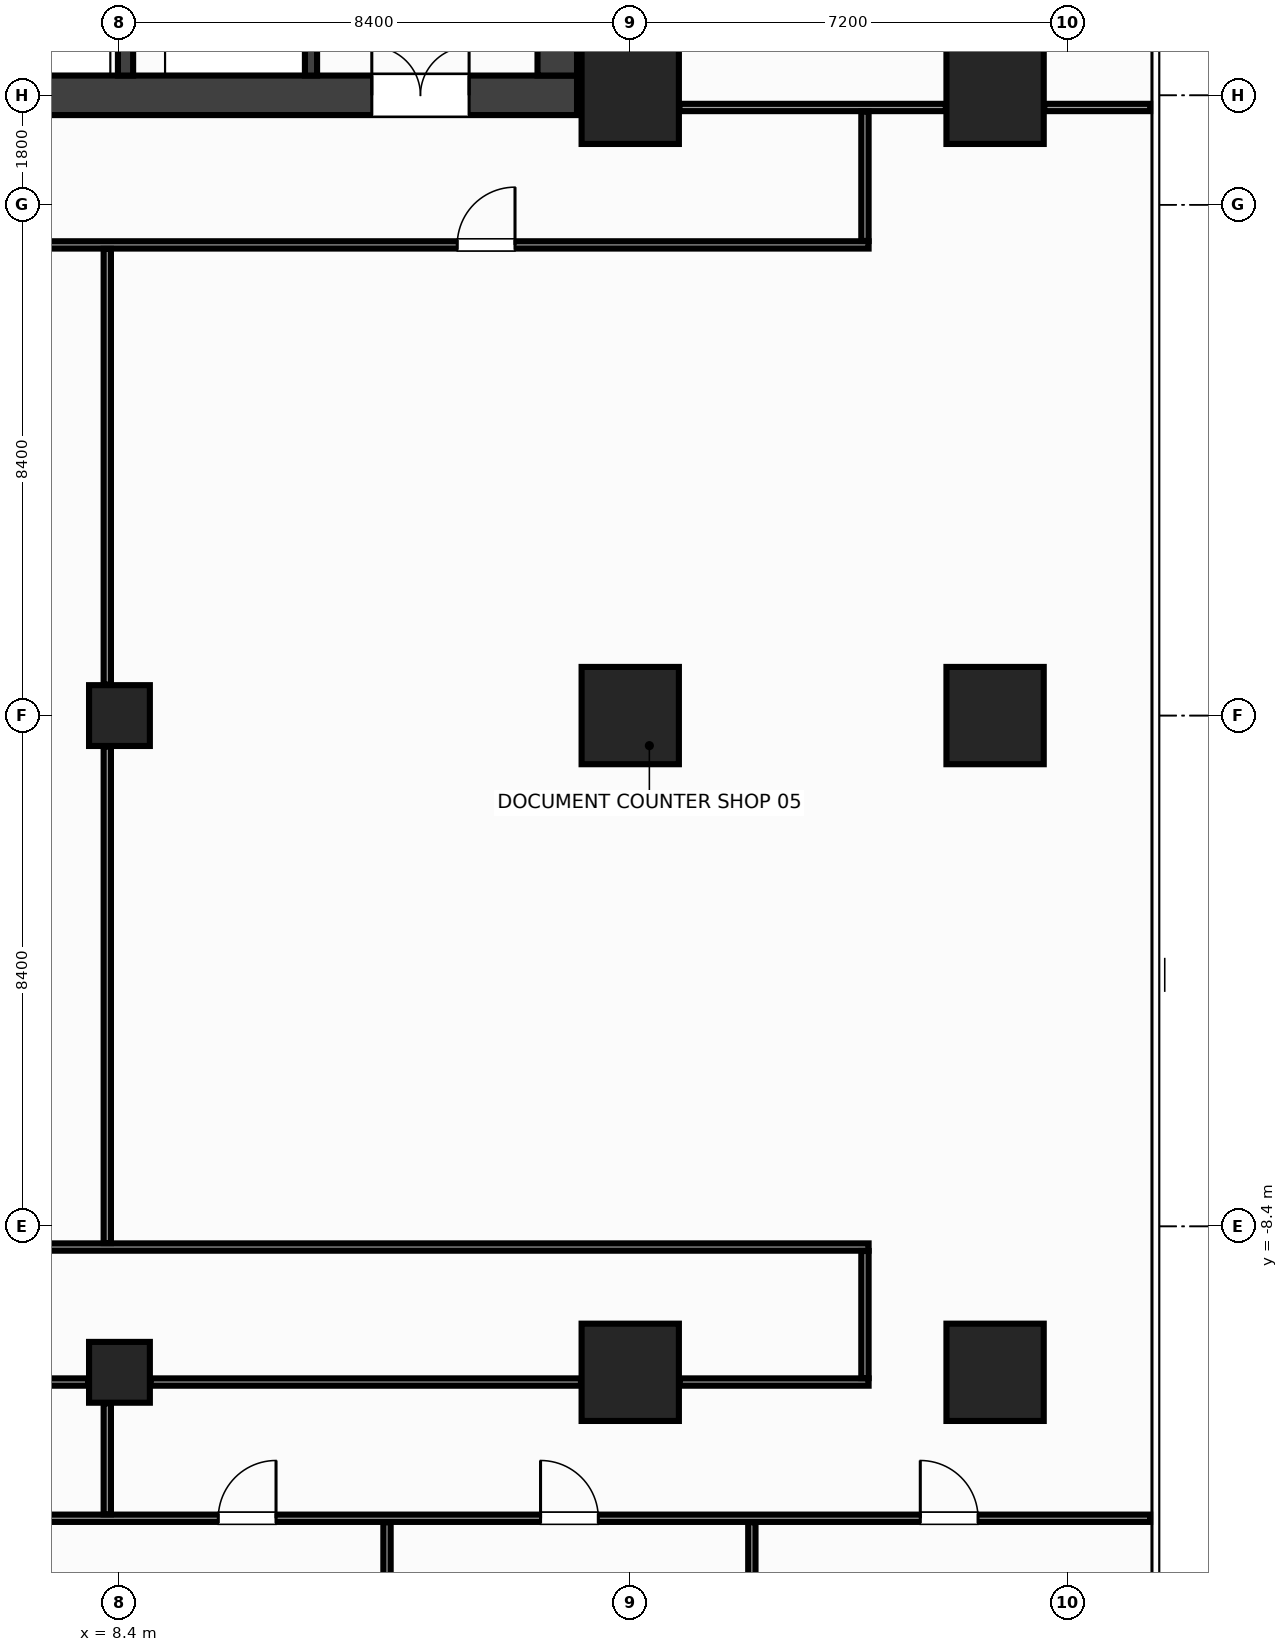
"""IFC4 building model, lengths in metres.
Left out: names, types, materials, properties, quantities, classifications, styles, units other than length and angle.
Written with IfcOpenShell. Run it as: python <this file> out.ifc"""

import sys

from ifc_helpers import new_model, si_unit, direction, frame, frame_2d, origin, origin_2d, place, context, subcontext, project, spatial, rectangle, hollow_rectangle, extrude, source, transform, mapped, element, fill, save


model = new_model("IFC4")
c1 = context("Model", 3, precision=1e-05, world=origin(), true_north=direction((0.0, 1.0)))
c2 = subcontext(c1, "Body", "Model", "MODEL_VIEW")
j1 = project(units=[si_unit("LENGTHUNIT", "METRE"), si_unit("PLANEANGLEUNIT", "RADIAN")], contexts=[c1])
p1 = place(None, origin())
s1 = spatial("IfcSite", under=j1, at=p1, CompositionType="ELEMENT")
p2 = place(p1, origin())
s2 = spatial("IfcBuilding", under=s1, at=p2, CompositionType="ELEMENT")
p3 = place(p2, frame((0.0, 0.0, 88.4)))
s3 = spatial("IfcBuildingStorey", under=s2, at=p3, CompositionType="ELEMENT", Elevation=88.4)
m1 = source(origin(), c2, "Body", "SweptSolid", [
    extrude(rectangle(XDim=31.85, YDim=0.65, at=frame_2d((15.925, 0.0))), origin(), (0.0, 0.0, 1.0), 3.6),
])
p4 = place(p3, frame((-15.925, 10.2, 0.0), z_axis=(0.0, 0.0, 1.0), x_axis=(1.0, 0.0, 0.0)))
e1 = element("IfcWall", 1, at=p4, inside=s3, PredefinedType="SHEAR", context=c2, shape_type="MappedRepresentation", body=[
    mapped(m1, transform((0.0, 0.0, 0.0), x_axis=(1.0, 0.0, 0.0), y_axis=(0.0, 1.0, 0.0), z_axis=(0.0, 0.0, 1.0), scale=1.0)),
])
p5 = place(p4, frame((1.775, 0.0, 0.0)))
e2 = element("IfcOpeningElement", 2, at=p5, cuts=e1, PredefinedType="OPENING", context=c2, shape_type="SweptSolid", body=[
    extrude(rectangle(XDim=1.6, YDim=2.15, at=frame_2d((0.8, 1.075))), frame((0.0, 0.337, 0.0), z_axis=(0.0, -1.0, 0.0), x_axis=(1.0, 0.0, 0.0)), (0.0, 0.0, 1.0), 0.674),
])
p6 = place(p4, frame((28.475, 0.0, 0.0)))
e3 = element("IfcOpeningElement", 3, at=p6, cuts=e1, PredefinedType="OPENING", context=c2, shape_type="SweptSolid", body=[
    extrude(rectangle(XDim=1.6, YDim=2.15, at=frame_2d((0.8, 1.075))), frame((0.0, 0.337, 0.0), z_axis=(0.0, -1.0, 0.0), x_axis=(1.0, 0.0, 0.0)), (0.0, 0.0, 1.0), 0.674),
])
p7 = place(p4, frame((15.175, 0.0, 0.0)))
e4 = element("IfcOpeningElement", 4, at=p7, cuts=e1, PredefinedType="OPENING", context=c2, shape_type="SweptSolid", body=[
    extrude(rectangle(XDim=1.5, YDim=2.2, at=frame_2d((0.75, 1.1))), frame((0.0, 0.337, 0.0), z_axis=(0.0, -1.0, 0.0), x_axis=(1.0, 0.0, 0.0)), (0.0, 0.0, 1.0), 0.674),
])
m2 = source(origin(), c2, "Body", "SweptSolid", [
    extrude(rectangle(XDim=12.95, YDim=0.65, at=frame_2d((6.475, 0.0))), origin(), (0.0, 0.0, 1.0), 3.6),
])
p8 = place(p3, frame((15.6, 10.525, 0.0), z_axis=(0.0, 0.0, 1.0), x_axis=(0.0, 1.0, 0.0)))
e5 = element("IfcWall", 5, at=p8, inside=s3, PredefinedType="SHEAR", context=c2, shape_type="MappedRepresentation", body=[
    mapped(m2, transform((0.0, 0.0, 0.0), x_axis=(1.0, 0.0, 0.0), y_axis=(0.0, 1.0, 0.0), z_axis=(0.0, 0.0, 1.0), scale=1.0)),
])
m3 = source(origin(), c2, "Body", "SweptSolid", [
    extrude(rectangle(XDim=12.95, YDim=0.25, at=frame_2d((6.475, 0.0))), origin(), (0.0, 0.0, 1.0), 3.6),
])
p9 = place(p3, frame((8.5, 10.525, 0.0), z_axis=(0.0, 0.0, 1.0), x_axis=(0.0, 1.0, 0.0)))
e6 = element("IfcWall", 6, at=p9, inside=s3, PredefinedType="SHEAR", context=c2, shape_type="MappedRepresentation", body=[
    mapped(m3, transform((0.0, 0.0, 0.0), x_axis=(1.0, 0.0, 0.0), y_axis=(0.0, 1.0, 0.0), z_axis=(0.0, 0.0, 1.0), scale=1.0)),
])
p10 = place(p9, frame((9.925, 0.0, 0.0)))
e7 = element("IfcOpeningElement", 7, at=p10, cuts=e6, PredefinedType="OPENING", context=c2, shape_type="SweptSolid", body=[
    extrude(rectangle(XDim=0.95, YDim=2.15, at=frame_2d((0.475, 1.075))), frame((0.0, 0.137, 0.0), z_axis=(0.0, -1.0, 0.0), x_axis=(1.0, 0.0, 0.0)), (0.0, 0.0, 1.0), 0.274),
])
m4 = source(origin(), c2, "Body", "SweptSolid", [
    extrude(rectangle(XDim=3.125, YDim=0.2, at=frame_2d((1.562, 0.0))), origin(), (0.0, 0.0, 1.0), 3.6),
])
p11 = place(p3, frame((11.55, 10.525, 0.0), z_axis=(0.0, 0.0, 1.0), x_axis=(0.0, 1.0, 0.0)))
e8 = element("IfcWall", 8, at=p11, inside=s3, PredefinedType="SHEAR", context=c2, shape_type="MappedRepresentation", body=[
    mapped(m4, transform((0.0, 0.0, 0.0), x_axis=(1.0, 0.0, 0.0), y_axis=(0.0, 1.0, 0.0), z_axis=(0.0, 0.0, 1.0), scale=1.0)),
])
p12 = place(p11, frame((0.9, 0.0, 0.0)))
e9 = element("IfcOpeningElement", 9, at=p12, cuts=e8, PredefinedType="OPENING", context=c2, shape_type="SweptSolid", body=[
    extrude(rectangle(XDim=1.1, YDim=2.15, at=frame_2d((0.55, 1.075))), frame((0.0, 0.112, 0.0), z_axis=(0.0, -1.0, 0.0), x_axis=(1.0, 0.0, 0.0)), (0.0, 0.0, 1.0), 0.224),
])
m5 = source(origin(), c2, "Body", "SweptSolid", [
    extrude(rectangle(XDim=1.6, YDim=1.6, at=origin_2d()), origin(), (0.0, 0.0, 1.0), 3.6),
])
for number, where, z_axis, x_axis in (
    (10, (16.8, -10.8, 0.0), (0.0, 0.0, 1.0), (1.0, 0.0, 0.0)),
    (11, (16.8, 0.0, 0.0), (0.0, 0.0, 1.0), (1.0, 0.0, 0.0)),
    (12, (16.8, 10.2, 0.0), (0.0, 0.0, 1.0), (1.0, 0.0, 0.0)),
    (13, (22.8, -10.8, 0.0), (0.0, 0.0, 1.0), (1.0, 0.0, 0.0)),
    (14, (22.8, 0.0, 0.0), (0.0, 0.0, 1.0), (1.0, 0.0, 0.0)),
    (15, (22.8, 10.2, 0.0), (0.0, 0.0, 1.0), (1.0, 0.0, 0.0)),
):
    element("IfcColumn", number, at=place(p3, frame(where, z_axis=z_axis, x_axis=x_axis)), inside=s3, PredefinedType="COLUMN", context=c2, shape_type="MappedRepresentation", body=[
        mapped(m5, transform((0.0, 0.0, 0.0), x_axis=(1.0, 0.0, 0.0), y_axis=(0.0, 1.0, 0.0), z_axis=(0.0, 0.0, 1.0), scale=1.0)),
    ])
m6 = source(origin(), c2, "Body", "SweptSolid", [
    extrude(hollow_rectangle(XDim=1.0, YDim=1.0, WallThickness=0.045, at=origin_2d()), origin(), (0.0, 0.0, 1.0), 3.6),
])
for number, where, z_axis, x_axis in (
    (16, (8.4, 0.0, 0.0), (0.0, 0.0, 1.0), (1.0, 0.0, 0.0)),
    (17, (8.4, -10.8, 0.0), (0.0, 0.0, 1.0), (1.0, 0.0, 0.0)),
):
    element("IfcColumn", number, at=place(p3, frame(where, z_axis=z_axis, x_axis=x_axis)), inside=s3, PredefinedType="COLUMN", context=c2, shape_type="MappedRepresentation", body=[
        mapped(m6, transform((0.0, 0.0, 0.0), x_axis=(1.0, 0.0, 0.0), y_axis=(0.0, 1.0, 0.0), z_axis=(0.0, 0.0, 1.0), scale=1.0)),
    ])
m7 = source(origin(), c2, "Body", "SweptSolid", [
    extrude(rectangle(XDim=4.38, YDim=0.12, at=frame_2d((2.19, 0.0))), origin(), (0.0, 0.0, 1.0), 2.745),
])
p13 = place(p3, frame((17.61, 10.0, 0.0), z_axis=(0.0, 0.0, 1.0), x_axis=(1.0, 0.0, 0.0)))
e18 = element("IfcWall", 18, at=p13, inside=s3, PredefinedType="PARTITIONING", context=c2, shape_type="MappedRepresentation", body=[
    mapped(m7, transform((0.0, 0.0, 0.0), x_axis=(1.0, 0.0, 0.0), y_axis=(0.0, 1.0, 0.0), z_axis=(0.0, 0.0, 1.0), scale=1.0)),
])
m8 = source(origin(), c2, "Body", "SweptSolid", [
    extrude(rectangle(XDim=1.74, YDim=0.12, at=frame_2d((0.87, 0.0))), origin(), (0.0, 0.0, 1.0), 3.36),
])
p14 = place(p3, frame((23.61, 10.0, 0.0), z_axis=(0.0, 0.0, 1.0), x_axis=(1.0, 0.0, 0.0)))
e19 = element("IfcWall", 19, at=p14, inside=s3, PredefinedType="PARTITIONING", context=c2, shape_type="MappedRepresentation", body=[
    mapped(m8, transform((0.0, 0.0, 0.0), x_axis=(1.0, 0.0, 0.0), y_axis=(0.0, 1.0, 0.0), z_axis=(0.0, 0.0, 1.0), scale=1.0)),
])
m9 = source(origin(), c2, "Body", "SweptSolid", [
    extrude(rectangle(XDim=22.3, YDim=0.12, at=frame_2d((11.15, 0.0))), origin(), (0.0, 0.0, 1.0), 2.745),
])
p15 = place(p3, frame((-1.58, 7.74, 0.0), z_axis=(0.0, 0.0, 1.0), x_axis=(1.0, 0.0, 0.0)))
e20 = element("IfcWall", 20, at=p15, inside=s3, PredefinedType="PARTITIONING", context=c2, shape_type="MappedRepresentation", body=[
    mapped(m9, transform((0.0, 0.0, 0.0), x_axis=(1.0, 0.0, 0.0), y_axis=(0.0, 1.0, 0.0), z_axis=(0.0, 0.0, 1.0), scale=1.0)),
])
p16 = place(p15, frame((4.445, 0.0, 0.0)))
e21 = element("IfcOpeningElement", 21, at=p16, cuts=e20, PredefinedType="OPENING", context=c2, shape_type="SweptSolid", body=[
    extrude(rectangle(XDim=0.95, YDim=2.15, at=frame_2d((0.475, 1.075))), frame((0.0, 0.072, 0.0), z_axis=(0.0, -1.0, 0.0), x_axis=(1.0, 0.0, 0.0)), (0.0, 0.0, 1.0), 0.144),
])
p17 = place(p15, frame((15.535, 0.0, 0.0)))
e22 = element("IfcOpeningElement", 22, at=p17, cuts=e20, PredefinedType="OPENING", context=c2, shape_type="SweptSolid", body=[
    extrude(rectangle(XDim=0.95, YDim=2.15, at=frame_2d((0.475, 1.075))), frame((0.0, 0.072, 0.0), z_axis=(0.0, -1.0, 0.0), x_axis=(1.0, 0.0, 0.0)), (0.0, 0.0, 1.0), 0.144),
])
p18 = place(p3, frame((-1.58, -8.74, 0.0), z_axis=(0.0, 0.0, 1.0), x_axis=(1.0, 0.0, 0.0)))
e23 = element("IfcWall", 23, at=p18, inside=s3, PredefinedType="PARTITIONING", context=c2, shape_type="MappedRepresentation", body=[
    mapped(m9, transform((0.0, 0.0, 0.0), x_axis=(1.0, 0.0, 0.0), y_axis=(0.0, 1.0, 0.0), z_axis=(0.0, 0.0, 1.0), scale=1.0)),
])
m10 = source(origin(), c2, "Body", "SweptSolid", [
    extrude(rectangle(XDim=7.38, YDim=0.12, at=frame_2d((3.69, 0.0))), origin(), (0.0, 0.0, 1.0), 2.745),
])
p19 = place(p3, frame((0.51, -10.96, 0.0), z_axis=(0.0, 0.0, 1.0), x_axis=(1.0, 0.0, 0.0)))
e24 = element("IfcWall", 24, at=p19, inside=s3, PredefinedType="PARTITIONING", context=c2, shape_type="MappedRepresentation", body=[
    mapped(m10, transform((0.0, 0.0, 0.0), x_axis=(1.0, 0.0, 0.0), y_axis=(0.0, 1.0, 0.0), z_axis=(0.0, 0.0, 1.0), scale=1.0)),
])
m11 = source(origin(), c2, "Body", "SweptSolid", [
    extrude(rectangle(XDim=7.08, YDim=0.12, at=frame_2d((3.54, 0.0))), origin(), (0.0, 0.0, 1.0), 2.745),
])
p20 = place(p3, frame((8.91, -10.96, 0.0), z_axis=(0.0, 0.0, 1.0), x_axis=(1.0, 0.0, 0.0)))
e25 = element("IfcWall", 25, at=p20, inside=s3, PredefinedType="PARTITIONING", context=c2, shape_type="MappedRepresentation", body=[
    mapped(m11, transform((0.0, 0.0, 0.0), x_axis=(1.0, 0.0, 0.0), y_axis=(0.0, 1.0, 0.0), z_axis=(0.0, 0.0, 1.0), scale=1.0)),
])
m12 = source(origin(), c2, "Body", "SweptSolid", [
    extrude(rectangle(XDim=3.11, YDim=0.12, at=frame_2d((1.555, 0.0))), origin(), (0.0, 0.0, 1.0), 2.745),
])
p21 = place(p3, frame((17.61, -10.96, 0.0), z_axis=(0.0, 0.0, 1.0), x_axis=(1.0, 0.0, 0.0)))
e26 = element("IfcWall", 26, at=p21, inside=s3, PredefinedType="PARTITIONING", context=c2, shape_type="MappedRepresentation", body=[
    mapped(m12, transform((0.0, 0.0, 0.0), x_axis=(1.0, 0.0, 0.0), y_axis=(0.0, 1.0, 0.0), z_axis=(0.0, 0.0, 1.0), scale=1.0)),
])
m13 = source(origin(), c2, "Body", "SweptSolid", [
    extrude(rectangle(XDim=2.13, YDim=0.12, at=frame_2d((1.065, 0.0))), origin(), (0.0, 0.0, 1.0), 3.36),
])
p22 = place(p3, frame((20.66, 7.805, 0.0), z_axis=(0.0, 0.0, 1.0), x_axis=(0.0, 1.0, 0.0)))
e27 = element("IfcWall", 27, at=p22, inside=s3, PredefinedType="PARTITIONING", context=c2, shape_type="MappedRepresentation", body=[
    mapped(m13, transform((0.0, 0.0, 0.0), x_axis=(1.0, 0.0, 0.0), y_axis=(0.0, 1.0, 0.0), z_axis=(0.0, 0.0, 1.0), scale=1.0)),
])
m14 = source(origin(), c2, "Body", "SweptSolid", [
    extrude(rectangle(XDim=2.09, YDim=0.12, at=frame_2d((1.045, 0.0))), origin(), (0.0, 0.0, 1.0), 3.36),
])
p23 = place(p3, frame((20.66, -10.895, 0.0), z_axis=(0.0, 0.0, 1.0), x_axis=(0.0, 1.0, 0.0)))
e28 = element("IfcWall", 28, at=p23, inside=s3, PredefinedType="PARTITIONING", context=c2, shape_type="MappedRepresentation", body=[
    mapped(m14, transform((0.0, 0.0, 0.0), x_axis=(1.0, 0.0, 0.0), y_axis=(0.0, 1.0, 0.0), z_axis=(0.0, 0.0, 1.0), scale=1.0)),
])
m15 = source(origin(), c2, "Body", "SweptSolid", [
    extrude(rectangle(XDim=50.7, YDim=0.12, at=frame_2d((25.35, 0.0))), origin(), (0.0, 0.0, 1.0), 2.945),
])
p24 = place(p3, frame((-25.35, -13.2, 0.0), z_axis=(0.0, 0.0, 1.0), x_axis=(1.0, 0.0, 0.0)))
e29 = element("IfcWall", 29, at=p24, inside=s3, PredefinedType="PARTITIONING", context=c2, shape_type="MappedRepresentation", body=[
    mapped(m15, transform((0.0, 0.0, 0.0), x_axis=(1.0, 0.0, 0.0), y_axis=(0.0, 1.0, 0.0), z_axis=(0.0, 0.0, 1.0), scale=1.0)),
])
p25 = place(p24, frame((46.92, 0.0, 0.0)))
e30 = element("IfcOpeningElement", 30, at=p25, cuts=e29, PredefinedType="OPENING", context=c2, shape_type="SweptSolid", body=[
    extrude(rectangle(XDim=0.95, YDim=2.15, at=frame_2d((0.475, 1.075))), frame((0.0, 0.072, 0.0), z_axis=(0.0, -1.0, 0.0), x_axis=(1.0, 0.0, 0.0)), (0.0, 0.0, 1.0), 0.144),
])
p26 = place(p24, frame((2.73, 0.0, 0.0)))
e31 = element("IfcOpeningElement", 31, at=p26, cuts=e29, PredefinedType="OPENING", context=c2, shape_type="SweptSolid", body=[
    extrude(rectangle(XDim=0.95, YDim=2.15, at=frame_2d((0.475, 1.075))), frame((0.0, 0.072, 0.0), z_axis=(0.0, -1.0, 0.0), x_axis=(1.0, 0.0, 0.0)), (0.0, 0.0, 1.0), 0.144),
])
p27 = place(p24, frame((9.375, 0.0, 0.0)))
e32 = element("IfcOpeningElement", 32, at=p27, cuts=e29, PredefinedType="OPENING", context=c2, shape_type="SweptSolid", body=[
    extrude(rectangle(XDim=0.95, YDim=2.15, at=frame_2d((0.475, 1.075))), frame((0.0, 0.072, 0.0), z_axis=(0.0, -1.0, 0.0), x_axis=(1.0, 0.0, 0.0)), (0.0, 0.0, 1.0), 0.144),
])
p28 = place(p24, frame((15.875, 0.0, 0.0)))
e33 = element("IfcOpeningElement", 33, at=p28, cuts=e29, PredefinedType="OPENING", context=c2, shape_type="SweptSolid", body=[
    extrude(rectangle(XDim=0.95, YDim=2.15, at=frame_2d((0.475, 1.075))), frame((0.0, 0.072, 0.0), z_axis=(0.0, -1.0, 0.0), x_axis=(1.0, 0.0, 0.0)), (0.0, 0.0, 1.0), 0.144),
])
p29 = place(p24, frame((24.875, 0.0, 0.0)))
e34 = element("IfcOpeningElement", 34, at=p29, cuts=e29, PredefinedType="OPENING", context=c2, shape_type="SweptSolid", body=[
    extrude(rectangle(XDim=0.95, YDim=2.15, at=frame_2d((0.475, 1.075))), frame((0.0, 0.072, 0.0), z_axis=(0.0, -1.0, 0.0), x_axis=(1.0, 0.0, 0.0)), (0.0, 0.0, 1.0), 0.144),
])
p30 = place(p24, frame((35.375, 0.0, 0.0)))
e35 = element("IfcOpeningElement", 35, at=p30, cuts=e29, PredefinedType="OPENING", context=c2, shape_type="SweptSolid", body=[
    extrude(rectangle(XDim=0.95, YDim=2.15, at=frame_2d((0.475, 1.075))), frame((0.0, 0.072, 0.0), z_axis=(0.0, -1.0, 0.0), x_axis=(1.0, 0.0, 0.0)), (0.0, 0.0, 1.0), 0.144),
])
p31 = place(p24, frame((40.675, 0.0, 0.0)))
e36 = element("IfcOpeningElement", 36, at=p31, cuts=e29, PredefinedType="OPENING", context=c2, shape_type="SweptSolid", body=[
    extrude(rectangle(XDim=0.95, YDim=2.15, at=frame_2d((0.475, 1.075))), frame((0.0, 0.072, 0.0), z_axis=(0.0, -1.0, 0.0), x_axis=(1.0, 0.0, 0.0)), (0.0, 0.0, 1.0), 0.144),
])
m16 = source(origin(), c2, "Body", "SweptSolid", [
    extrude(rectangle(XDim=1.825, YDim=0.12, at=frame_2d((0.913, 0.0))), origin(), (0.0, 0.0, 1.0), 2.945),
])
p32 = place(p3, frame((8.2, -13.135, 0.0), z_axis=(0.0, 0.0, 1.0), x_axis=(0.0, 1.0, 0.0)))
e37 = element("IfcWall", 37, at=p32, inside=s3, PredefinedType="PARTITIONING", context=c2, shape_type="MappedRepresentation", body=[
    mapped(m16, transform((0.0, 0.0, 0.0), x_axis=(1.0, 0.0, 0.0), y_axis=(0.0, 1.0, 0.0), z_axis=(0.0, 0.0, 1.0), scale=1.0)),
])
m17 = source(origin(), c2, "Body", "SweptSolid", [
    extrude(rectangle(XDim=8.165, YDim=0.12, at=frame_2d((4.083, 0.0))), origin(), (0.0, 0.0, 1.0), 2.745),
])
p33 = place(p3, frame((8.2, -8.675, 0.0), z_axis=(0.0, 0.0, 1.0), x_axis=(0.0, 1.0, 0.0)))
e38 = element("IfcWall", 38, at=p33, inside=s3, PredefinedType="PARTITIONING", context=c2, shape_type="MappedRepresentation", body=[
    mapped(m17, transform((0.0, 0.0, 0.0), x_axis=(1.0, 0.0, 0.0), y_axis=(0.0, 1.0, 0.0), z_axis=(0.0, 0.0, 1.0), scale=1.0)),
])
m18 = source(origin(), c2, "Body", "SweptSolid", [
    extrude(rectangle(XDim=7.165, YDim=0.12, at=frame_2d((3.583, 0.0))), origin(), (0.0, 0.0, 1.0), 2.645),
])
p34 = place(p3, frame((8.2, 0.51, 0.0), z_axis=(0.0, 0.0, 1.0), x_axis=(0.0, 1.0, 0.0)))
e39 = element("IfcWall", 39, at=p34, inside=s3, PredefinedType="PARTITIONING", context=c2, shape_type="MappedRepresentation", body=[
    mapped(m18, transform((0.0, 0.0, 0.0), x_axis=(1.0, 0.0, 0.0), y_axis=(0.0, 1.0, 0.0), z_axis=(0.0, 0.0, 1.0), scale=1.0)),
])
m19 = source(origin(), c2, "Body", "SweptSolid", [
    extrude(rectangle(XDim=12.385, YDim=0.12, at=frame_2d((6.192, 0.0))), origin(), (0.0, 0.0, 1.0), 2.745),
])
for number, where, z_axis, x_axis in (
    (40, (12.8, -25.65, 0.0), (0.0, 0.0, 1.0), (0.0, 1.0, 0.0)),
    (41, (18.8, -25.65, 0.0), (0.0, 0.0, 1.0), (0.0, 1.0, 0.0)),
):
    element("IfcWall", number, at=place(p3, frame(where, z_axis=z_axis, x_axis=x_axis)), inside=s3, PredefinedType="PARTITIONING", context=c2, shape_type="MappedRepresentation", body=[
        mapped(m19, transform((0.0, 0.0, 0.0), x_axis=(1.0, 0.0, 0.0), y_axis=(0.0, 1.0, 0.0), z_axis=(0.0, 0.0, 1.0), scale=1.0)),
    ])
m20 = source(origin(), c2, "Body", "SweptSolid", [
    extrude(rectangle(XDim=1.6, YDim=2.15, at=frame_2d((0.8, 1.075))), frame((0.0, 0.025, 0.0), z_axis=(0.0, -1.0, 0.0), x_axis=(1.0, 0.0, 0.0)), (0.0, 0.0, 1.0), 0.05),
])
p35 = place(p6, origin())
e42 = element("IfcDoor", 42, at=p35, inside=s3, OperationType="DOUBLE_DOOR_SINGLE_SWING", PredefinedType="DOOR", context=c2, shape_type="MappedRepresentation", body=[
    mapped(m20, transform((0.0, 0.0, 0.0), x_axis=(1.0, 0.0, 0.0), y_axis=(0.0, 1.0, 0.0), z_axis=(0.0, 0.0, 1.0), scale=1.0)),
])
fill(e3, e42)
m21 = source(origin(), c2, "Body", "SweptSolid", [
    extrude(rectangle(XDim=0.95, YDim=2.15, at=frame_2d((0.475, 1.075))), frame((0.0, 0.025, 0.0), z_axis=(0.0, -1.0, 0.0), x_axis=(1.0, 0.0, 0.0)), (0.0, 0.0, 1.0), 0.05),
])
p36 = place(p17, origin())
e43 = element("IfcDoor", 43, at=p36, inside=s3, OperationType="SINGLE_SWING_RIGHT", PredefinedType="DOOR", context=c2, shape_type="MappedRepresentation", body=[
    mapped(m21, transform((0.0, 0.0, 0.0), x_axis=(1.0, 0.0, 0.0), y_axis=(0.0, 1.0, 0.0), z_axis=(0.0, 0.0, 1.0), scale=1.0)),
])
fill(e22, e43)
p37 = place(p25, origin())
e44 = element("IfcDoor", 44, at=p37, inside=s3, OperationType="SINGLE_SWING_LEFT", PredefinedType="DOOR", context=c2, shape_type="MappedRepresentation", body=[
    mapped(m21, transform((0.0, 0.0, 0.0), x_axis=(1.0, 0.0, 0.0), y_axis=(0.0, 1.0, 0.0), z_axis=(0.0, 0.0, 1.0), scale=1.0)),
])
fill(e30, e44)
p38 = place(p30, origin())
e45 = element("IfcDoor", 45, at=p38, inside=s3, OperationType="SINGLE_SWING_RIGHT", PredefinedType="DOOR", context=c2, shape_type="MappedRepresentation", body=[
    mapped(m21, transform((0.0, 0.0, 0.0), x_axis=(1.0, 0.0, 0.0), y_axis=(0.0, 1.0, 0.0), z_axis=(0.0, 0.0, 1.0), scale=1.0)),
])
fill(e35, e45)
p39 = place(p31, origin())
e46 = element("IfcDoor", 46, at=p39, inside=s3, OperationType="SINGLE_SWING_LEFT", PredefinedType="DOOR", context=c2, shape_type="MappedRepresentation", body=[
    mapped(m21, transform((0.0, 0.0, 0.0), x_axis=(1.0, 0.0, 0.0), y_axis=(0.0, 1.0, 0.0), z_axis=(0.0, 0.0, 1.0), scale=1.0)),
])
fill(e36, e46)
save(model, sys.argv[1])
